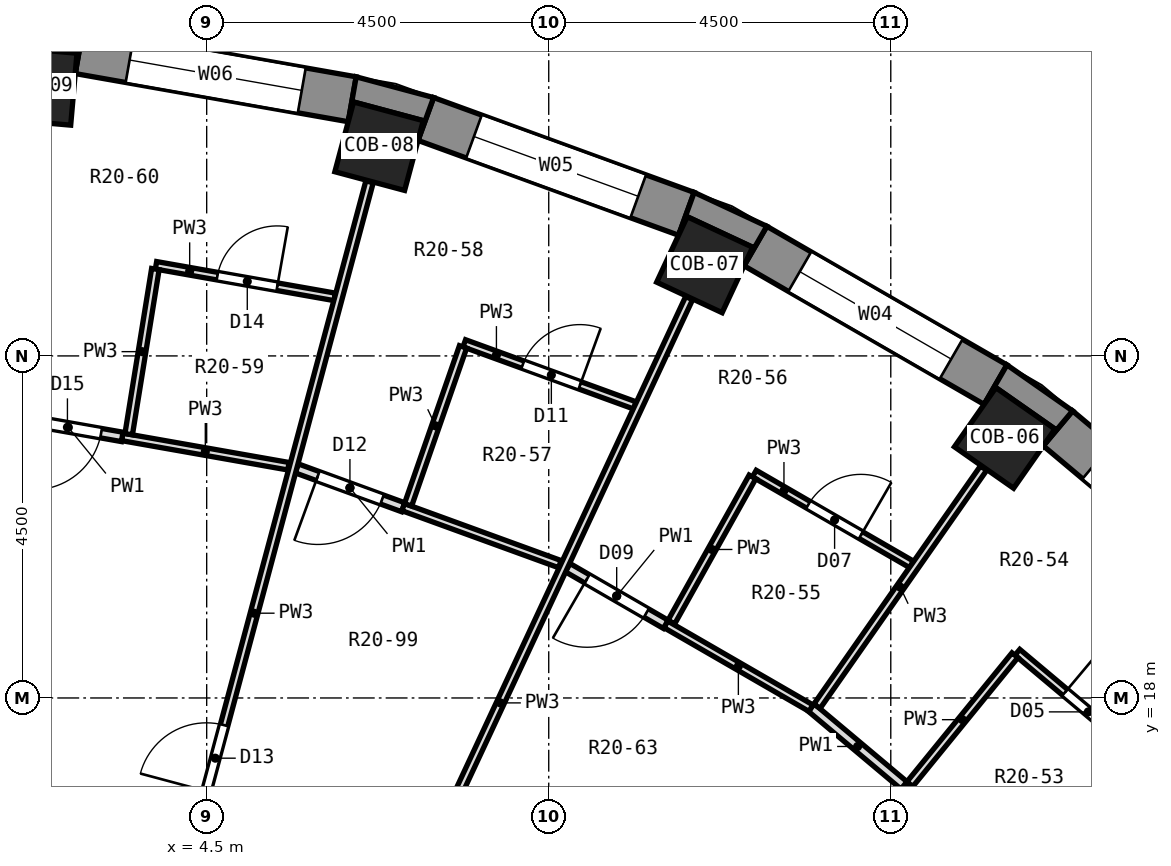
"""IFC4 building model, lengths in metres.
Left out: names, types, materials, properties, quantities, classifications, styles, units other than length and angle.
Written with IfcOpenShell. Run it as: python <this file> out.ifc"""

import sys

from ifc_helpers import new_model, si_unit, direction, frame, frame_2d, origin, origin_2d, place, context, subcontext, project, spatial, polyline, rectangle, outline, extrude, element, fill, save


model = new_model("IFC4")
c1 = context("Model", 3, precision=1e-05, world=origin(), true_north=direction((0.0, 1.0)))
c2 = subcontext(c1, "Body", "Model", "MODEL_VIEW")
j1 = project(units=[si_unit("LENGTHUNIT", "METRE"), si_unit("PLANEANGLEUNIT", "RADIAN")], contexts=[c1])
p1 = place(None, origin())
s1 = spatial("IfcSite", under=j1, at=p1, CompositionType="ELEMENT")
p2 = place(p1, origin())
s2 = spatial("IfcBuilding", under=s1, at=p2, CompositionType="ELEMENT")
p3 = place(p2, frame((0.0, 0.0, 121.6)))
s3 = spatial("IfcBuildingStorey", under=s2, at=p3, CompositionType="ELEMENT", Elevation=121.6)
for number, where, z_axis, x_axis in (
    (1, (14.999, 21.421, 0.0), (0.0, 0.0, 1.0), (0.574, 0.819, 0.0)),
    (2, (11.052, 23.7, 0.0), (0.0, 0.0, 1.0), (0.423, 0.906, 0.0)),
    (3, (6.768, 25.259, 0.0), (0.0, 0.0, 1.0), (0.259, 0.966, 0.0)),
    (4, (2.279, 26.051, 0.0), (0.0, 0.0, 1.0), (0.087, 0.996, 0.0)),
):
    element("IfcColumn", number, at=place(p3, frame(where, z_axis=z_axis, x_axis=x_axis)), inside=s3, PredefinedType="COLUMN", context=c2, shape_type="SweptSolid", body=[
        extrude(rectangle(XDim=0.95, YDim=0.95, at=origin_2d()), origin(), (0.0, 0.0, 1.0), 3.3),
    ])
p4 = place(p3, frame((18.494, 19.202, 0.0), z_axis=(0.0, 0.0, 1.0), x_axis=(-0.766055462616, 0.642774476932, 0.0)))
e5 = element("IfcWall", 5, at=p4, inside=s3, PredefinedType="SOLIDWALL", context=c2, shape_type="SweptSolid", body=[
    extrude(rectangle(XDim=3.648, YDim=0.6, at=frame_2d((1.824, 0.0))), origin(), (0.0, 0.0, 1.0), 2.8),
])
p5 = place(p4, frame((0.674, 0.0, 0.9)))
e6 = element("IfcOpeningElement", 6, at=p5, cuts=e5, PredefinedType="OPENING", context=c2, shape_type="SweptSolid", body=[
    extrude(rectangle(XDim=2.3, YDim=1.8, at=frame_2d((1.15, 0.9))), frame((0.0, 0.312, 0.0), z_axis=(0.0, -1.0, 0.0), x_axis=(1.0, 0.0, 0.0)), (0.0, 0.0, 1.0), 0.624),
])
p6 = place(p3, frame((14.878, 22.122, 0.0), z_axis=(0.0, 0.0, 1.0), x_axis=(-0.866051847062, 0.499954196102, 0.0)))
e7 = element("IfcWall", 7, at=p6, inside=s3, PredefinedType="SOLIDWALL", context=c2, shape_type="SweptSolid", body=[
    extrude(rectangle(XDim=3.648, YDim=0.6, at=frame_2d((1.824, 0.0))), origin(), (0.0, 0.0, 1.0), 2.8),
])
p7 = place(p6, frame((0.674, 0.0, 0.9)))
e8 = element("IfcOpeningElement", 8, at=p7, cuts=e7, PredefinedType="OPENING", context=c2, shape_type="SweptSolid", body=[
    extrude(rectangle(XDim=2.3, YDim=1.8, at=frame_2d((1.15, 0.9))), frame((0.0, 0.312, 0.0), z_axis=(0.0, -1.0, 0.0), x_axis=(1.0, 0.0, 0.0)), (0.0, 0.0, 1.0), 0.624),
])
p8 = place(p3, frame((10.811, 24.369, 0.0), z_axis=(0.0, 0.0, 1.0), x_axis=(-0.939703505393, 0.341990236633, 0.0)))
e9 = element("IfcWall", 9, at=p8, inside=s3, PredefinedType="SOLIDWALL", context=c2, shape_type="SweptSolid", body=[
    extrude(rectangle(XDim=3.648, YDim=0.6, at=frame_2d((1.824, 0.0))), origin(), (0.0, 0.0, 1.0), 2.8),
])
p9 = place(p8, frame((0.674, 0.0, 0.9)))
e10 = element("IfcOpeningElement", 10, at=p9, cuts=e9, PredefinedType="OPENING", context=c2, shape_type="SweptSolid", body=[
    extrude(rectangle(XDim=2.3, YDim=1.8, at=frame_2d((1.15, 0.9))), frame((0.0, 0.312, 0.0), z_axis=(0.0, -1.0, 0.0), x_axis=(1.0, 0.0, 0.0)), (0.0, 0.0, 1.0), 0.624),
])
p10 = place(p3, frame((6.415, 25.876, 0.0), z_axis=(0.0, 0.0, 1.0), x_axis=(-0.984803764455, 0.173670796382, 0.0)))
e11 = element("IfcWall", 11, at=p10, inside=s3, PredefinedType="SOLIDWALL", context=c2, shape_type="SweptSolid", body=[
    extrude(rectangle(XDim=3.648, YDim=0.6, at=frame_2d((1.824, 0.0))), origin(), (0.0, 0.0, 1.0), 2.8),
])
p11 = place(p10, frame((0.674, 0.0, 0.9)))
e12 = element("IfcOpeningElement", 12, at=p11, cuts=e11, PredefinedType="OPENING", context=c2, shape_type="SweptSolid", body=[
    extrude(rectangle(XDim=2.3, YDim=1.8, at=frame_2d((1.15, 0.9))), frame((0.0, 0.312, 0.0), z_axis=(0.0, -1.0, 0.0), x_axis=(1.0, 0.0, 0.0)), (0.0, 0.0, 1.0), 0.624),
])
p12 = place(p3, origin())
e13 = element("IfcWall", 13, at=p12, inside=s3, PredefinedType="SOLIDWALL", context=c2, shape_type="SweptSolid", body=[
    extrude(outline(polyline([(15.028, 22.382), (14.728, 21.862), (14.882, 22.083), (15.661, 21.538), (15.506, 21.317), (15.892, 21.777), (15.028, 22.382)])), origin(), (0.0, 0.0, 1.0), 2.8),
])
p13 = place(p3, origin())
e14 = element("IfcWall", 14, at=p13, inside=s3, PredefinedType="SOLIDWALL", context=c2, shape_type="SweptSolid", body=[
    extrude(outline(polyline([(10.913, 24.651), (10.708, 24.087), (10.822, 24.331), (11.683, 23.93), (11.569, 23.686), (11.869, 24.206), (10.913, 24.651)])), origin(), (0.0, 0.0, 1.0), 2.8),
])
p14 = place(p3, origin())
e15 = element("IfcWall", 15, at=p14, inside=s3, PredefinedType="SOLIDWALL", context=c2, shape_type="SweptSolid", body=[
    extrude(outline(polyline([(7.486, 25.899), (6.467, 26.172), (6.363, 25.581), (6.432, 25.841), (7.35, 25.595), (7.28, 25.335), (7.486, 25.899)])), origin(), (0.0, 0.0, 1.0), 2.8),
])
p15 = place(p3, origin())
e16 = element("IfcWall", 16, at=p15, inside=s3, PredefinedType="SOLIDWALL", context=c2, shape_type="SweptSolid", body=[
    extrude(outline(polyline([(2.875, 26.805), (1.824, 26.897), (1.824, 26.297), (1.847, 26.565), (2.794, 26.482), (2.77, 26.215), (2.875, 26.805)])), origin(), (0.0, 0.0, 1.0), 2.8),
])
p16 = place(p3, frame((13.674, 16.85, 0.0), z_axis=(0.0, 0.0, 1.0), x_axis=(0.766138779905, -0.642675166725, 0.0)))
e17 = element("IfcWall", 17, at=p16, inside=s3, PredefinedType="PARTITIONING", context=c2, shape_type="SweptSolid", body=[
    extrude(rectangle(XDim=2.205, YDim=0.1, at=frame_2d((1.103, 0.0))), origin(), (0.0, 0.0, 1.0), 2.8),
])
p17 = place(p3, frame((12.454, 17.874, 0.0), z_axis=(0.0, 0.0, 1.0), x_axis=(0.765991783553, -0.642850361693, 0.0)))
e18 = element("IfcWall", 18, at=p17, inside=s3, PredefinedType="PARTITIONING", context=c2, shape_type="SweptSolid", body=[
    extrude(rectangle(XDim=1.592, YDim=0.125, at=frame_2d((0.796, 0.0))), origin(), (0.0, 0.0, 1.0), 2.8),
])
p18 = place(p3, frame((15.165, 18.601, 0.0), z_axis=(0.0, 0.0, 1.0), x_axis=(0.765894146118, -0.642966684161, 0.0)))
e19 = element("IfcWall", 19, at=p18, inside=s3, PredefinedType="PARTITIONING", context=c2, shape_type="SweptSolid", body=[
    extrude(rectangle(XDim=2.439, YDim=0.1, at=frame_2d((1.219, 0.0))), origin(), (0.0, 0.0, 1.0), 2.8),
])
p19 = place(p18, frame((0.819, 0.0, 0.0)))
e20 = element("IfcOpeningElement", 20, at=p19, cuts=e19, PredefinedType="OPENING", context=c2, shape_type="SweptSolid", body=[
    extrude(rectangle(XDim=0.8, YDim=2.1, at=frame_2d((0.4, 1.05))), frame((0.0, 0.062, 0.0), z_axis=(0.0, -1.0, 0.0), x_axis=(1.0, 0.0, 0.0)), (0.0, 0.0, 1.0), 0.124),
])
p20 = place(p3, frame((10.54, 18.969, 0.0), z_axis=(0.0, 0.0, 1.0), x_axis=(0.866006764117, -0.500032283461, 0.0)))
e21 = element("IfcWall", 21, at=p20, inside=s3, PredefinedType="PARTITIONING", context=c2, shape_type="SweptSolid", body=[
    extrude(rectangle(XDim=2.205, YDim=0.1, at=frame_2d((1.103, 0.0))), origin(), (0.0, 0.0, 1.0), 2.8),
])
p21 = place(p3, frame((9.248, 19.715, 0.0), z_axis=(0.0, 0.0, 1.0), x_axis=(0.865896584481, -0.500223055231, 0.0)))
e22 = element("IfcWall", 22, at=p21, inside=s3, PredefinedType="PARTITIONING", context=c2, shape_type="SweptSolid", body=[
    extrude(rectangle(XDim=1.491, YDim=0.125, at=frame_2d((0.746, 0.0))), origin(), (0.0, 0.0, 1.0), 2.8),
])
p22 = place(p21, frame((0.296, 0.0, 0.0)))
e23 = element("IfcOpeningElement", 23, at=p22, cuts=e22, PredefinedType="OPENING", context=c2, shape_type="SweptSolid", body=[
    extrude(rectangle(XDim=0.9, YDim=2.1, at=frame_2d((0.45, 1.05))), frame((0.0, 0.074, 0.0), z_axis=(0.0, -1.0, 0.0), x_axis=(1.0, 0.0, 0.0)), (0.0, 0.0, 1.0), 0.149),
])
p23 = place(p3, frame((11.705, 20.952, 0.0), z_axis=(0.0, 0.0, 1.0), x_axis=(0.865906392454, -0.500206077039, 0.0)))
e24 = element("IfcWall", 24, at=p23, inside=s3, PredefinedType="PARTITIONING", context=c2, shape_type="SweptSolid", body=[
    extrude(rectangle(XDim=2.389, YDim=0.1, at=frame_2d((1.194, 0.0))), origin(), (0.0, 0.0, 1.0), 2.8),
])
p24 = place(p23, frame((0.82, 0.0, 0.0)))
e25 = element("IfcOpeningElement", 25, at=p24, cuts=e24, PredefinedType="OPENING", context=c2, shape_type="SweptSolid", body=[
    extrude(rectangle(XDim=0.8, YDim=2.1, at=frame_2d((0.4, 1.05))), frame((0.0, 0.062, 0.0), z_axis=(0.0, -1.0, 0.0), x_axis=(1.0, 0.0, 0.0)), (0.0, 0.0, 1.0), 0.124),
])
p25 = place(p3, frame((5.684, 21.021, 0.0), z_axis=(0.0, 0.0, 1.0), x_axis=(0.939314629693, -0.343056885143, 0.0)))
e26 = element("IfcWall", 26, at=p25, inside=s3, PredefinedType="PARTITIONING", context=c2, shape_type="SweptSolid", body=[
    extrude(rectangle(XDim=1.492, YDim=0.125, at=frame_2d((0.746, 0.0))), origin(), (0.0, 0.0, 1.0), 2.8),
])
p26 = place(p25, frame((0.296, 0.0, 0.0)))
e27 = element("IfcOpeningElement", 27, at=p26, cuts=e26, PredefinedType="OPENING", context=c2, shape_type="SweptSolid", body=[
    extrude(rectangle(XDim=0.9, YDim=2.1, at=frame_2d((0.45, 1.05))), frame((0.0, 0.074, 0.0), z_axis=(0.0, -1.0, 0.0), x_axis=(1.0, 0.0, 0.0)), (0.0, 0.0, 1.0), 0.149),
])
p27 = place(p3, frame((7.086, 20.51, 0.0), z_axis=(0.0, 0.0, 1.0), x_axis=(0.939734879809, -0.341904015289, 0.0)))
e28 = element("IfcWall", 28, at=p27, inside=s3, PredefinedType="PARTITIONING", context=c2, shape_type="SweptSolid", body=[
    extrude(rectangle(XDim=2.192, YDim=0.1, at=frame_2d((1.096, 0.0))), origin(), (0.0, 0.0, 1.0), 2.8),
])
p28 = place(p3, frame((7.889, 22.666, 0.0), z_axis=(0.0, 0.0, 1.0), x_axis=(0.939679950861, -0.342054951652, 0.0)))
e29 = element("IfcWall", 29, at=p28, inside=s3, PredefinedType="PARTITIONING", context=c2, shape_type="SweptSolid", body=[
    extrude(rectangle(XDim=2.388, YDim=0.1, at=frame_2d((1.194, 0.0))), origin(), (0.0, 0.0, 1.0), 2.8),
])
p29 = place(p28, frame((0.819, 0.0, 0.0)))
e30 = element("IfcOpeningElement", 30, at=p29, cuts=e29, PredefinedType="OPENING", context=c2, shape_type="SweptSolid", body=[
    extrude(rectangle(XDim=0.8, YDim=2.1, at=frame_2d((0.4, 1.05))), frame((0.0, 0.062, 0.0), z_axis=(0.0, -1.0, 0.0), x_axis=(1.0, 0.0, 0.0)), (0.0, 0.0, 1.0), 0.124),
])
p30 = place(p3, frame((3.389, 21.435, 0.0), z_axis=(0.0, 0.0, 1.0), x_axis=(0.984795731746, -0.173716339864, 0.0)))
e31 = element("IfcWall", 31, at=p30, inside=s3, PredefinedType="PARTITIONING", context=c2, shape_type="SweptSolid", body=[
    extrude(rectangle(XDim=2.22, YDim=0.1, at=frame_2d((1.11, 0.0))), origin(), (0.0, 0.0, 1.0), 2.8),
])
p31 = place(p3, frame((1.972, 21.684, 0.0), z_axis=(0.0, 0.0, 1.0), x_axis=(0.984843298649, -0.173446467555, 0.0)))
e32 = element("IfcWall", 32, at=p31, inside=s3, PredefinedType="PARTITIONING", context=c2, shape_type="SweptSolid", body=[
    extrude(rectangle(XDim=1.438, YDim=0.125, at=frame_2d((0.719, 0.0))), origin(), (0.0, 0.0, 1.0), 2.8),
])
p32 = place(p31, frame((0.257, 0.0, 0.0)))
e33 = element("IfcOpeningElement", 33, at=p32, cuts=e32, PredefinedType="OPENING", context=c2, shape_type="SweptSolid", body=[
    extrude(rectangle(XDim=0.9, YDim=2.1, at=frame_2d((0.45, 1.05))), frame((0.0, 0.074, 0.0), z_axis=(0.0, -1.0, 0.0), x_axis=(1.0, 0.0, 0.0)), (0.0, 0.0, 1.0), 0.149),
])
p33 = place(p3, frame((3.833, 23.692, 0.0), z_axis=(0.0, 0.0, 1.0), x_axis=(0.984788703161, -0.173756180111, 0.0)))
e34 = element("IfcWall", 34, at=p33, inside=s3, PredefinedType="PARTITIONING", context=c2, shape_type="SweptSolid", body=[
    extrude(rectangle(XDim=2.389, YDim=0.1, at=frame_2d((1.194, 0.0))), origin(), (0.0, 0.0, 1.0), 2.8),
])
p34 = place(p33, frame((0.82, 0.0, 0.0)))
e35 = element("IfcOpeningElement", 35, at=p34, cuts=e34, PredefinedType="OPENING", context=c2, shape_type="SweptSolid", body=[
    extrude(rectangle(XDim=0.8, YDim=2.1, at=frame_2d((0.4, 1.05))), frame((0.0, 0.062, 0.0), z_axis=(0.0, -1.0, 0.0), x_axis=(1.0, 0.0, 0.0)), (0.0, 0.0, 1.0), 0.124),
])
p35 = place(p3, frame((15.436, 15.436, 0.0), z_axis=(0.0, 0.0, 1.0), x_axis=(0.707106781187, 0.707106781187, 0.0)))
e36 = element("IfcWall", 36, at=p35, inside=s3, PredefinedType="PARTITIONING", context=c2, shape_type="SweptSolid", body=[
    extrude(rectangle(XDim=2.208, YDim=0.1, at=frame_2d((1.104, 0.0))), origin(), (0.0, 0.0, 1.0), 2.8),
])
p36 = place(p3, frame((13.751, 16.866, 0.0), z_axis=(0.0, 0.0, 1.0), x_axis=(0.631692824826, 0.775218791738, 0.0)))
e37 = element("IfcWall", 37, at=p36, inside=s3, PredefinedType="PARTITIONING", context=c2, shape_type="SweptSolid", body=[
    extrude(rectangle(XDim=2.188, YDim=0.1, at=frame_2d((1.094, 0.0))), origin(), (0.0, 0.0, 1.0), 2.8),
])
p37 = place(p3, frame((12.53, 17.892, 0.0), z_axis=(0.0, 0.0, 1.0), x_axis=(0.573235132975, 0.819390921553, 0.0)))
e38 = element("IfcWall", 38, at=p37, inside=s3, PredefinedType="PARTITIONING", context=c2, shape_type="SweptSolid", body=[
    extrude(rectangle(XDim=3.823, YDim=0.1, at=frame_2d((1.911, 0.0))), origin(), (0.0, 0.0, 1.0), 2.8),
])
p38 = place(p3, frame((10.614, 18.999, 0.0), z_axis=(0.0, 0.0, 1.0), x_axis=(0.487811352464, 0.872949073204, 0.0)))
e39 = element("IfcWall", 39, at=p38, inside=s3, PredefinedType="PARTITIONING", context=c2, shape_type="SweptSolid", body=[
    extrude(rectangle(XDim=2.188, YDim=0.1, at=frame_2d((1.094, 0.0))), origin(), (0.0, 0.0, 1.0), 2.8),
])
p39 = place(p3, frame((5.881, 12.611, 0.0), z_axis=(0.0, 0.0, 1.0), x_axis=(0.422604500324, 0.906314203964, 0.0)))
e40 = element("IfcWall", 40, at=p39, inside=s3, PredefinedType="PARTITIONING", context=c2, shape_type="SweptSolid", body=[
    extrude(rectangle(XDim=11.75, YDim=0.1, at=frame_2d((5.875, 0.0))), origin(), (0.0, 0.0, 1.0), 2.8),
])
p40 = place(p39, frame((3.45, 0.0, 0.0)))
e41 = element("IfcOpeningElement", 41, at=p40, cuts=e40, PredefinedType="OPENING", context=c2, shape_type="SweptSolid", body=[
    extrude(rectangle(XDim=0.9, YDim=2.1, at=frame_2d((0.45, 1.05))), frame((0.0, 0.062, 0.0), z_axis=(0.0, -1.0, 0.0), x_axis=(1.0, 0.0, 0.0)), (0.0, 0.0, 1.0), 0.124),
])
p41 = place(p3, frame((7.149, 20.541, 0.0), z_axis=(0.0, 0.0, 1.0), x_axis=(0.328718620018, 0.944427905588, 0.0)))
e42 = element("IfcWall", 42, at=p41, inside=s3, PredefinedType="PARTITIONING", context=c2, shape_type="SweptSolid", body=[
    extrude(rectangle(XDim=2.2, YDim=0.1, at=frame_2d((1.1, 0.0))), origin(), (0.0, 0.0, 1.0), 2.8),
])
p42 = place(p3, frame((3.605, 13.44, 0.0), z_axis=(0.0, 0.0, 1.0), x_axis=(0.258538057112, 0.966001072994, 0.0)))
e43 = element("IfcWall", 43, at=p42, inside=s3, PredefinedType="PARTITIONING", context=c2, shape_type="SweptSolid", body=[
    extrude(rectangle(XDim=11.75, YDim=0.1, at=frame_2d((5.875, 0.0))), origin(), (0.0, 0.0, 1.0), 2.8),
])
p43 = place(p42, frame((3.45, 0.0, 0.0)))
e44 = element("IfcOpeningElement", 44, at=p43, cuts=e43, PredefinedType="OPENING", context=c2, shape_type="SweptSolid", body=[
    extrude(rectangle(XDim=0.9, YDim=2.1, at=frame_2d((0.45, 1.05))), frame((0.0, 0.062, 0.0), z_axis=(0.0, -1.0, 0.0), x_axis=(1.0, 0.0, 0.0)), (0.0, 0.0, 1.0), 0.124),
])
p44 = place(p3, frame((3.474, 21.47, 0.0), z_axis=(0.0, 0.0, 1.0), x_axis=(0.159556862709, 0.987188739585, 0.0)))
e45 = element("IfcWall", 45, at=p44, inside=s3, PredefinedType="PARTITIONING", context=c2, shape_type="SweptSolid", body=[
    extrude(rectangle(XDim=2.2, YDim=0.1, at=frame_2d((1.1, 0.0))), origin(), (0.0, 0.0, 1.0), 2.8),
])
p45 = place(p5, origin())
e46 = element("IfcWindow", 46, at=p45, inside=s3, PartitioningType="SINGLE_PANEL", PredefinedType="WINDOW", context=c2, shape_type="SweptSolid", body=[
    extrude(rectangle(XDim=2.3, YDim=1.8, at=frame_2d((1.15, 0.9))), frame((0.0, 0.18, 0.0), z_axis=(0.0, -1.0, 0.0), x_axis=(1.0, 0.0, 0.0)), (0.0, 0.0, 1.0), 0.06),
])
fill(e6, e46)
p46 = place(p7, origin())
e47 = element("IfcWindow", 47, at=p46, inside=s3, PartitioningType="SINGLE_PANEL", PredefinedType="WINDOW", context=c2, shape_type="SweptSolid", body=[
    extrude(rectangle(XDim=2.3, YDim=1.8, at=frame_2d((1.15, 0.9))), frame((0.0, 0.18, 0.0), z_axis=(0.0, -1.0, 0.0), x_axis=(1.0, 0.0, 0.0)), (0.0, 0.0, 1.0), 0.06),
])
fill(e8, e47)
p47 = place(p9, origin())
e48 = element("IfcWindow", 48, at=p47, inside=s3, PartitioningType="SINGLE_PANEL", PredefinedType="WINDOW", context=c2, shape_type="SweptSolid", body=[
    extrude(rectangle(XDim=2.3, YDim=1.8, at=frame_2d((1.15, 0.9))), frame((0.0, 0.18, 0.0), z_axis=(0.0, -1.0, 0.0), x_axis=(1.0, 0.0, 0.0)), (0.0, 0.0, 1.0), 0.06),
])
fill(e10, e48)
p48 = place(p11, origin())
e49 = element("IfcWindow", 49, at=p48, inside=s3, PartitioningType="SINGLE_PANEL", PredefinedType="WINDOW", context=c2, shape_type="SweptSolid", body=[
    extrude(rectangle(XDim=2.3, YDim=1.8, at=frame_2d((1.15, 0.9))), frame((0.0, 0.18, 0.0), z_axis=(0.0, -1.0, 0.0), x_axis=(1.0, 0.0, 0.0)), (0.0, 0.0, 1.0), 0.06),
])
fill(e12, e49)
p49 = place(p19, origin())
e50 = element("IfcDoor", 50, at=p49, inside=s3, OperationType="SINGLE_SWING_LEFT", PredefinedType="DOOR", context=c2, shape_type="SweptSolid", body=[
    extrude(rectangle(XDim=0.8, YDim=2.1, at=frame_2d((0.4, 1.05))), frame((0.0, 0.025, 0.0), z_axis=(0.0, -1.0, 0.0), x_axis=(1.0, 0.0, 0.0)), (0.0, 0.0, 1.0), 0.05),
])
fill(e20, e50)
p50 = place(p24, origin())
e51 = element("IfcDoor", 51, at=p50, inside=s3, OperationType="SINGLE_SWING_RIGHT", PredefinedType="DOOR", context=c2, shape_type="SweptSolid", body=[
    extrude(rectangle(XDim=0.8, YDim=2.1, at=frame_2d((0.4, 1.05))), frame((0.0, 0.025, 0.0), z_axis=(0.0, -1.0, 0.0), x_axis=(1.0, 0.0, 0.0)), (0.0, 0.0, 1.0), 0.05),
])
fill(e25, e51)
p51 = place(p22, frame((0.9, 0.0, 0.0), z_axis=(0.0, 0.0, 1.0), x_axis=(-1.0, 0.0, 0.0)))
e52 = element("IfcDoor", 52, at=p51, inside=s3, OperationType="SINGLE_SWING_RIGHT", PredefinedType="DOOR", context=c2, shape_type="SweptSolid", body=[
    extrude(rectangle(XDim=0.9, YDim=2.1, at=frame_2d((0.45, 1.05))), frame((0.0, 0.025, 0.0), z_axis=(0.0, -1.0, 0.0), x_axis=(1.0, 0.0, 0.0)), (0.0, 0.0, 1.0), 0.05),
])
fill(e23, e52)
p52 = place(p29, origin())
e53 = element("IfcDoor", 53, at=p52, inside=s3, OperationType="SINGLE_SWING_RIGHT", PredefinedType="DOOR", context=c2, shape_type="SweptSolid", body=[
    extrude(rectangle(XDim=0.8, YDim=2.1, at=frame_2d((0.4, 1.05))), frame((0.0, 0.025, 0.0), z_axis=(0.0, -1.0, 0.0), x_axis=(1.0, 0.0, 0.0)), (0.0, 0.0, 1.0), 0.05),
])
fill(e30, e53)
p53 = place(p26, frame((0.9, 0.0, 0.0), z_axis=(0.0, 0.0, 1.0), x_axis=(-1.0, 0.0, 0.0)))
e54 = element("IfcDoor", 54, at=p53, inside=s3, OperationType="SINGLE_SWING_RIGHT", PredefinedType="DOOR", context=c2, shape_type="SweptSolid", body=[
    extrude(rectangle(XDim=0.9, YDim=2.1, at=frame_2d((0.45, 1.05))), frame((0.0, 0.025, 0.0), z_axis=(0.0, -1.0, 0.0), x_axis=(1.0, 0.0, 0.0)), (0.0, 0.0, 1.0), 0.05),
])
fill(e27, e54)
p54 = place(p43, origin())
e55 = element("IfcDoor", 55, at=p54, inside=s3, OperationType="SINGLE_SWING_LEFT", PredefinedType="DOOR", context=c2, shape_type="SweptSolid", body=[
    extrude(rectangle(XDim=0.9, YDim=2.1, at=frame_2d((0.45, 1.05))), frame((0.0, 0.025, 0.0), z_axis=(0.0, -1.0, 0.0), x_axis=(1.0, 0.0, 0.0)), (0.0, 0.0, 1.0), 0.05),
])
fill(e44, e55)
p55 = place(p34, origin())
e56 = element("IfcDoor", 56, at=p55, inside=s3, OperationType="SINGLE_SWING_RIGHT", PredefinedType="DOOR", context=c2, shape_type="SweptSolid", body=[
    extrude(rectangle(XDim=0.8, YDim=2.1, at=frame_2d((0.4, 1.05))), frame((0.0, 0.025, 0.0), z_axis=(0.0, -1.0, 0.0), x_axis=(1.0, 0.0, 0.0)), (0.0, 0.0, 1.0), 0.05),
])
fill(e35, e56)
p56 = place(p32, frame((0.9, 0.0, 0.0), z_axis=(0.0, 0.0, 1.0), x_axis=(-1.0, 0.0, 0.0)))
e57 = element("IfcDoor", 57, at=p56, inside=s3, OperationType="SINGLE_SWING_RIGHT", PredefinedType="DOOR", context=c2, shape_type="SweptSolid", body=[
    extrude(rectangle(XDim=0.9, YDim=2.1, at=frame_2d((0.45, 1.05))), frame((0.0, 0.025, 0.0), z_axis=(0.0, -1.0, 0.0), x_axis=(1.0, 0.0, 0.0)), (0.0, 0.0, 1.0), 0.05),
])
fill(e33, e57)
save(model, sys.argv[1])
